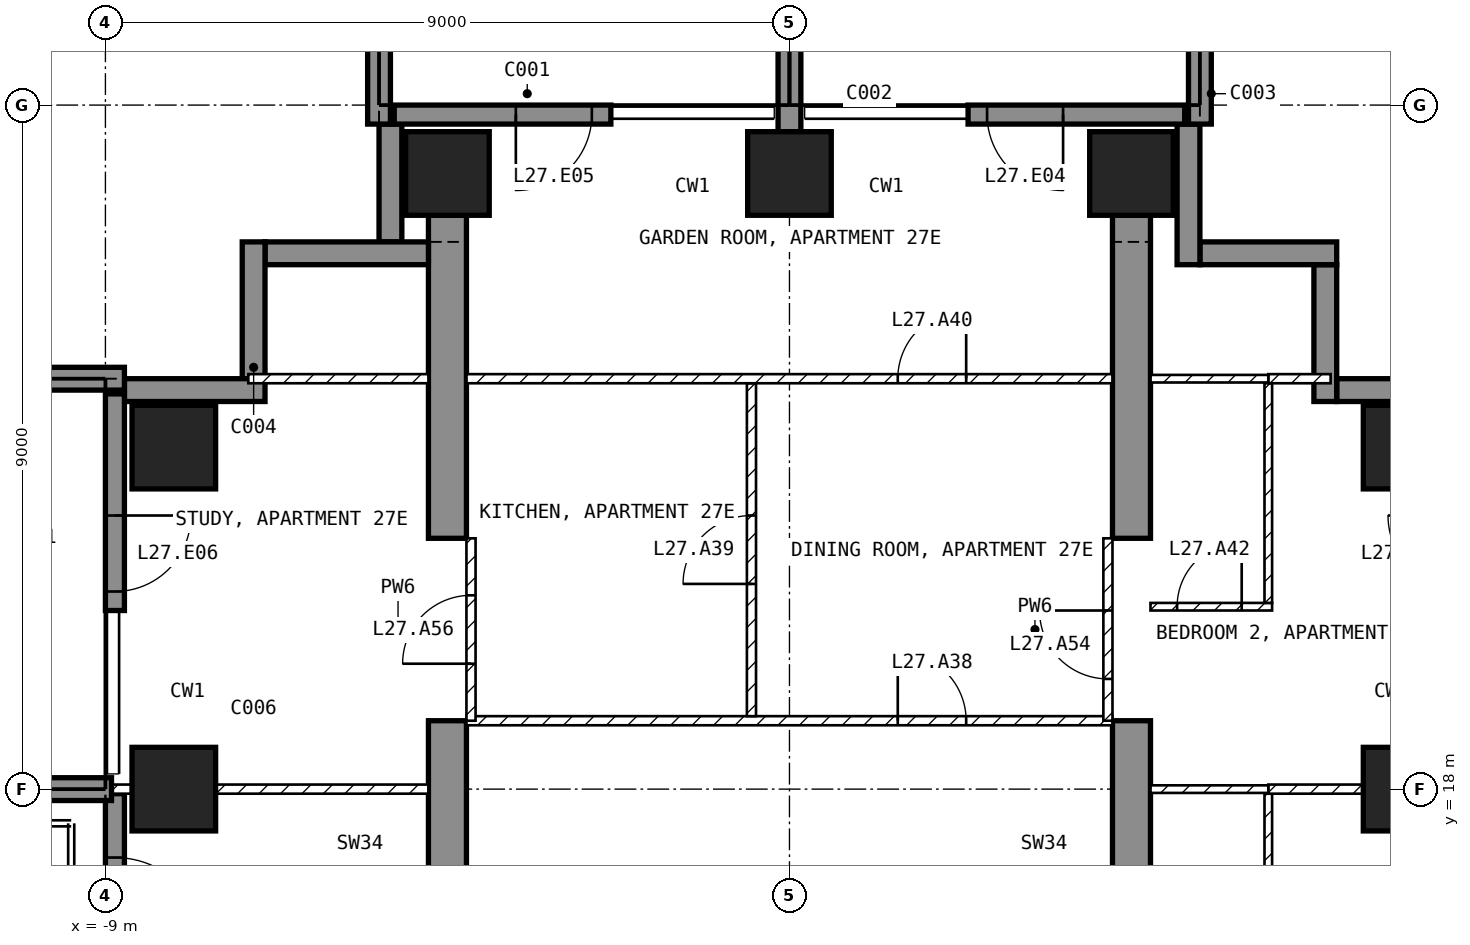
"""IFC4 building model, lengths in metres.
Left out: names, types, materials, properties, quantities, classifications, styles, units other than length and angle.
Written with IfcOpenShell. Run it as: python <this file> out.ifc"""

import sys

from ifc_helpers import new_model, si_unit, direction, frame, frame_2d, origin, origin_2d, place, context, subcontext, project, spatial, polyline, rectangle, outline, extrude, element, fill, save


model = new_model("IFC4")
c1 = context("Model", 3, precision=1e-05, world=origin(), true_north=direction((0.0, 1.0)))
c2 = subcontext(c1, "Body", "Model", "MODEL_VIEW")
j1 = project(units=[si_unit("LENGTHUNIT", "METRE"), si_unit("PLANEANGLEUNIT", "RADIAN")], contexts=[c1])
p1 = place(None, origin())
s1 = spatial("IfcSite", under=j1, at=p1, CompositionType="ELEMENT")
p2 = place(p1, origin())
s2 = spatial("IfcBuilding", under=s1, at=p2, CompositionType="ELEMENT")
p3 = place(p2, frame((0.0, 0.0, 116.4)))
s3 = spatial("IfcBuildingStorey", under=s2, at=p3, CompositionType="ELEMENT", Elevation=116.4)
for number, where, z_axis, x_axis in (
    (1, (-8.1, 18.0, -0.25), (0.0, 0.0, 1.0), (1.0, 0.0, 0.0)),
    (2, (-8.1, 22.5, -0.25), (0.0, 0.0, 1.0), (1.0, 0.0, 0.0)),
    (3, (-4.5, 26.1, -0.25), (0.0, 0.0, 1.0), (1.0, 0.0, 0.0)),
    (4, (0.0, 26.1, -0.25), (0.0, 0.0, 1.0), (1.0, 0.0, 0.0)),
    (5, (4.5, 26.1, -0.25), (0.0, 0.0, 1.0), (1.0, 0.0, 0.0)),
    (6, (8.1, 18.0, -0.25), (0.0, 0.0, 1.0), (1.0, 0.0, 0.0)),
    (7, (8.1, 22.5, -0.25), (0.0, 0.0, 1.0), (1.0, 0.0, 0.0)),
):
    element("IfcColumn", number, at=place(p3, frame(where, z_axis=z_axis, x_axis=x_axis)), inside=s3, PredefinedType="COLUMN", context=c2, shape_type="SweptSolid", body=[
        extrude(rectangle(XDim=1.1, YDim=1.1, at=origin_2d()), origin(), (0.0, 0.0, 1.0), 3.5),
    ])
for number, where, z_axis, x_axis in (
    (8, (-4.75, 9.0, -0.25), (1.0, 0.0, 0.0), (0.0, 1.0, 0.0)),
    (9, (4.25, 9.0, -0.25), (1.0, 0.0, 0.0), (0.0, 1.0, 0.0)),
):
    element("IfcWall", number, at=place(p3, frame(where, z_axis=z_axis, x_axis=x_axis)), inside=s3, PredefinedType="SHEAR", context=c2, shape_type="SweptSolid", body=[
        extrude(outline(polyline([(0.0, 0.0), (2.1, 0.0), (2.1, 2.65), (4.5, 2.65), (4.5, 0.0), (9.9, 0.0), (9.9, 2.65), (12.3, 2.65), (12.3, 0.0), (16.55, 0.0), (16.55, 3.5), (0.0, 3.5), (0.0, 0.0)])), origin(), (0.0, 0.0, 1.0), 0.5),
    ])
p4 = place(p3, frame((5.2, 26.875, 0.0), z_axis=(0.0, 0.0, 1.0), x_axis=(-1.0, 0.0, 0.0)))
e10 = element("IfcWall", 10, at=p4, inside=s3, PredefinedType="SOLIDWALL", context=c2, shape_type="SweptSolid", body=[
    extrude(rectangle(XDim=2.85, YDim=0.25, at=frame_2d((1.425, 0.0))), origin(), (0.0, 0.0, 1.0), 3.25),
])
p5 = place(p4, frame((1.6, 0.0, 0.0)))
e11 = element("IfcOpeningElement", 11, at=p5, cuts=e10, PredefinedType="OPENING", context=c2, shape_type="SweptSolid", body=[
    extrude(rectangle(XDim=1.0, YDim=2.4, at=frame_2d((0.5, 1.2))), frame((0.0, 0.135, 0.0), z_axis=(0.0, -1.0, 0.0), x_axis=(1.0, 0.0, 0.0)), (0.0, 0.0, 1.0), 0.27),
])
p6 = place(p3, frame((-2.35, 26.875, 0.0), z_axis=(0.0, 0.0, 1.0), x_axis=(-1.0, 0.0, 0.0)))
e12 = element("IfcWall", 12, at=p6, inside=s3, PredefinedType="SOLIDWALL", context=c2, shape_type="SweptSolid", body=[
    extrude(rectangle(XDim=2.85, YDim=0.25, at=frame_2d((1.425, 0.0))), origin(), (0.0, 0.0, 1.0), 3.25),
])
p7 = place(p6, frame((0.25, 0.0, 0.0)))
e13 = element("IfcOpeningElement", 13, at=p7, cuts=e12, PredefinedType="OPENING", context=c2, shape_type="SweptSolid", body=[
    extrude(rectangle(XDim=1.0, YDim=2.4, at=frame_2d((0.5, 1.2))), frame((0.0, 0.135, 0.0), z_axis=(0.0, -1.0, 0.0), x_axis=(1.0, 0.0, 0.0)), (0.0, 0.0, 1.0), 0.27),
])
p8 = place(p3, frame((-8.875, 23.2, 0.0), z_axis=(0.0, 0.0, 1.0), x_axis=(0.0, -1.0, 0.0)))
e14 = element("IfcWall", 14, at=p8, inside=s3, PredefinedType="SOLIDWALL", context=c2, shape_type="SweptSolid", body=[
    extrude(rectangle(XDim=2.85, YDim=0.25, at=frame_2d((1.425, 0.0))), origin(), (0.0, 0.0, 1.0), 3.25),
])
p9 = place(p8, frame((1.6, 0.0, 0.0)))
e15 = element("IfcOpeningElement", 15, at=p9, cuts=e14, PredefinedType="OPENING", context=c2, shape_type="SweptSolid", body=[
    extrude(rectangle(XDim=1.0, YDim=2.4, at=frame_2d((0.5, 1.2))), frame((0.0, 0.135, 0.0), z_axis=(0.0, -1.0, 0.0), x_axis=(1.0, 0.0, 0.0)), (0.0, 0.0, 1.0), 0.27),
])
p10 = place(p3, frame((-8.875, 17.94, 0.0), z_axis=(0.0, 0.0, 1.0), x_axis=(0.0, -1.0, 0.0)))
e16 = element("IfcWall", 16, at=p10, inside=s3, PredefinedType="SOLIDWALL", context=c2, shape_type="SweptSolid", body=[
    extrude(rectangle(XDim=2.29, YDim=0.25, at=frame_2d((1.145, 0.0))), origin(), (0.0, 0.0, 1.0), 3.25),
])
p11 = place(p10, frame((0.84, 0.0, 0.0)))
e17 = element("IfcOpeningElement", 17, at=p11, cuts=e16, PredefinedType="OPENING", context=c2, shape_type="SweptSolid", body=[
    extrude(rectangle(XDim=1.2, YDim=2.4, at=frame_2d((0.6, 1.2))), frame((0.0, 0.135, 0.0), z_axis=(0.0, -1.0, 0.0), x_axis=(1.0, 0.0, 0.0)), (0.0, 0.0, 1.0), 0.27),
])
p12 = place(p3, frame((8.75, 23.25, 0.0), z_axis=(0.0, 0.0, 1.0), x_axis=(-1.0, 0.0, 0.0)))
e18 = element("IfcWall", 18, at=p12, inside=s3, PredefinedType="SOLIDWALL", context=c2, shape_type="SweptSolid", body=[
    extrude(rectangle(XDim=1.55, YDim=0.3, at=frame_2d((0.775, 0.0))), origin(), (0.0, 0.0, 1.0), 3.25),
])
p13 = place(p3, frame((7.05, 23.1, 0.0), z_axis=(0.0, 0.0, 1.0), x_axis=(0.0, 1.0, 0.0)))
e19 = element("IfcWall", 19, at=p13, inside=s3, PredefinedType="SOLIDWALL", context=c2, shape_type="SweptSolid", body=[
    extrude(rectangle(XDim=1.8, YDim=0.3, at=frame_2d((0.9, 0.0))), origin(), (0.0, 0.0, 1.0), 3.25),
])
p14 = place(p3, frame((7.2, 25.05, 0.0), z_axis=(0.0, 0.0, 1.0), x_axis=(-1.0, 0.0, 0.0)))
e20 = element("IfcWall", 20, at=p14, inside=s3, PredefinedType="SOLIDWALL", context=c2, shape_type="SweptSolid", body=[
    extrude(rectangle(XDim=1.8, YDim=0.3, at=frame_2d((0.9, 0.0))), origin(), (0.0, 0.0, 1.0), 3.25),
])
p15 = place(p3, frame((5.25, 24.9, 0.0), z_axis=(0.0, 0.0, 1.0), x_axis=(0.0, 1.0, 0.0)))
e21 = element("IfcWall", 21, at=p15, inside=s3, PredefinedType="SOLIDWALL", context=c2, shape_type="SweptSolid", body=[
    extrude(rectangle(XDim=1.85, YDim=0.3, at=frame_2d((0.925, 0.0))), origin(), (0.0, 0.0, 1.0), 3.25),
])
p16 = place(p3, frame((-5.25, 26.75, 0.0), z_axis=(0.0, 0.0, 1.0), x_axis=(0.0, -1.0, 0.0)))
e22 = element("IfcWall", 22, at=p16, inside=s3, PredefinedType="SOLIDWALL", context=c2, shape_type="SweptSolid", body=[
    extrude(rectangle(XDim=1.55, YDim=0.3, at=frame_2d((0.775, 0.0))), origin(), (0.0, 0.0, 1.0), 3.25),
])
p17 = place(p3, frame((-4.75, 25.05, 0.0), z_axis=(0.0, 0.0, 1.0), x_axis=(-1.0, 0.0, 0.0)))
e23 = element("IfcWall", 23, at=p17, inside=s3, PredefinedType="SOLIDWALL", context=c2, shape_type="SweptSolid", body=[
    extrude(rectangle(XDim=2.15, YDim=0.3, at=frame_2d((1.075, 0.0))), origin(), (0.0, 0.0, 1.0), 3.25),
])
p18 = place(p3, frame((-7.05, 25.2, 0.0), z_axis=(0.0, 0.0, 1.0), x_axis=(0.0, -1.0, 0.0)))
e24 = element("IfcWall", 24, at=p18, inside=s3, PredefinedType="SOLIDWALL", context=c2, shape_type="SweptSolid", body=[
    extrude(rectangle(XDim=1.8, YDim=0.3, at=frame_2d((0.9, 0.0))), origin(), (0.0, 0.0, 1.0), 3.25),
])
p19 = place(p3, frame((-6.9, 23.25, 0.0), z_axis=(0.0, 0.0, 1.0), x_axis=(-1.0, 0.0, 0.0)))
e25 = element("IfcWall", 25, at=p19, inside=s3, PredefinedType="SOLIDWALL", context=c2, shape_type="SweptSolid", body=[
    extrude(rectangle(XDim=1.85, YDim=0.3, at=frame_2d((0.925, 0.0))), origin(), (0.0, 0.0, 1.0), 3.25),
])
p20 = place(p3, frame((-8.92, 18.0, 0.0), z_axis=(0.0, 0.0, 1.0), x_axis=(-1.0, 0.0, 0.0)))
e26 = element("IfcWall", 26, at=p20, inside=s3, PredefinedType="SOLIDWALL", context=c2, shape_type="SweptSolid", body=[
    extrude(rectangle(XDim=2.82, YDim=0.3, at=frame_2d((1.41, 0.0))), origin(), (0.0, 0.0, 1.0), 3.25),
])
for number, where, z_axis, x_axis in (
    (27, (-8.75, 23.4, 0.0), (0.0, 0.0, 1.0), (-1.0, 0.0, 0.0)),
    (28, (-5.4, 26.75, 0.0), (0.0, 0.0, 1.0), (0.0, 1.0, 0.0)),
):
    element("IfcWall", number, at=place(p3, frame(where, z_axis=z_axis, x_axis=x_axis)), inside=s3, PredefinedType="SOLIDWALL", context=c2, shape_type="SweptSolid", body=[
        extrude(rectangle(XDim=2.95, YDim=0.3, at=frame_2d((1.475, 0.0))), origin(), (0.0, 0.0, 1.0), 3.25),
    ])
p21 = place(p3, frame((0.0, 26.65, 0.0), z_axis=(0.0, 0.0, 1.0), x_axis=(0.0, 1.0, 0.0)))
e29 = element("IfcWall", 29, at=p21, inside=s3, PredefinedType="SOLIDWALL", context=c2, shape_type="SweptSolid", body=[
    extrude(rectangle(XDim=3.05, YDim=0.3, at=frame_2d((1.525, 0.0))), origin(), (0.0, 0.0, 1.0), 3.25),
])
p22 = place(p3, frame((5.4, 26.75, 0.0), z_axis=(0.0, 0.0, 1.0), x_axis=(0.0, 1.0, 0.0)))
e30 = element("IfcWall", 30, at=p22, inside=s3, PredefinedType="SOLIDWALL", context=c2, shape_type="SweptSolid", body=[
    extrude(rectangle(XDim=2.95, YDim=0.3, at=frame_2d((1.475, 0.0))), origin(), (0.0, 0.0, 1.0), 3.25),
])
p23 = place(p3, frame((-4.25, 18.9, 0.0), z_axis=(0.0, 0.0, 1.0), x_axis=(1.0, 0.0, 0.0)))
e31 = element("IfcWall", 31, at=p23, inside=s3, PredefinedType="PARTITIONING", context=c2, shape_type="SweptSolid", body=[
    extrude(rectangle(XDim=8.5, YDim=0.12, at=frame_2d((4.25, 0.0))), origin(), (0.0, 0.0, 1.0), 3.25),
])
p24 = place(p23, frame((5.675, 0.0, 0.0)))
e32 = element("IfcOpeningElement", 32, at=p24, cuts=e31, PredefinedType="OPENING", context=c2, shape_type="SweptSolid", body=[
    extrude(rectangle(XDim=0.9, YDim=2.1, at=frame_2d((0.45, 1.05))), frame((0.0, 0.07, 0.0), z_axis=(0.0, -1.0, 0.0), x_axis=(1.0, 0.0, 0.0)), (0.0, 0.0, 1.0), 0.14),
])
p25 = place(p3, frame((-0.5, 18.96, 0.0), z_axis=(0.0, 0.0, 1.0), x_axis=(0.0, 1.0, 0.0)))
e33 = element("IfcWall", 33, at=p25, inside=s3, PredefinedType="PARTITIONING", context=c2, shape_type="SweptSolid", body=[
    extrude(rectangle(XDim=4.38, YDim=0.12, at=frame_2d((2.19, 0.0))), origin(), (0.0, 0.0, 1.0), 3.25),
])
p26 = place(p25, frame((1.74, 0.0, 0.0)))
e34 = element("IfcOpeningElement", 34, at=p26, cuts=e33, PredefinedType="OPENING", context=c2, shape_type="SweptSolid", body=[
    extrude(rectangle(XDim=0.9, YDim=2.1, at=frame_2d((0.45, 1.05))), frame((0.0, 0.07, 0.0), z_axis=(0.0, -1.0, 0.0), x_axis=(1.0, 0.0, 0.0)), (0.0, 0.0, 1.0), 0.14),
])
p27 = place(p3, frame((-4.25, 23.4, 0.0), z_axis=(0.0, 0.0, 1.0), x_axis=(1.0, 0.0, 0.0)))
e35 = element("IfcWall", 35, at=p27, inside=s3, PredefinedType="PARTITIONING", context=c2, shape_type="SweptSolid", body=[
    extrude(rectangle(XDim=8.5, YDim=0.12, at=frame_2d((4.25, 0.0))), origin(), (0.0, 0.0, 1.0), 3.25),
])
p28 = place(p27, frame((5.675, 0.0, 0.0)))
e36 = element("IfcOpeningElement", 36, at=p28, cuts=e35, PredefinedType="OPENING", context=c2, shape_type="SweptSolid", body=[
    extrude(rectangle(XDim=0.9, YDim=2.1, at=frame_2d((0.45, 1.05))), frame((0.0, 0.07, 0.0), z_axis=(0.0, -1.0, 0.0), x_axis=(1.0, 0.0, 0.0)), (0.0, 0.0, 1.0), 0.14),
])
p29 = place(p3, frame((6.3, 14.45, 0.0), z_axis=(0.0, 0.0, 1.0), x_axis=(0.0, 1.0, 0.0)))
e37 = element("IfcWall", 37, at=p29, inside=s3, PredefinedType="PARTITIONING", context=c2, shape_type="SweptSolid", body=[
    extrude(rectangle(XDim=3.49, YDim=0.1, at=frame_2d((1.745, 0.0))), origin(), (0.0, 0.0, 1.0), 3.25),
])
p30 = place(p3, frame((6.3, 18.0, 0.0), z_axis=(0.0, 0.0, 1.0), x_axis=(1.0, 0.0, 0.0)))
e38 = element("IfcWall", 38, at=p30, inside=s3, PredefinedType="PARTITIONING", context=c2, shape_type="SweptSolid", body=[
    extrude(rectangle(XDim=2.62, YDim=0.12, at=frame_2d((1.31, 0.0))), origin(), (0.0, 0.0, 1.0), 2.414),
])
p31 = place(p3, frame((4.75, 18.0, 0.0), z_axis=(0.0, 0.0, 1.0), x_axis=(1.0, 0.0, 0.0)))
e39 = element("IfcWall", 39, at=p31, inside=s3, PredefinedType="PARTITIONING", context=c2, shape_type="SweptSolid", body=[
    extrude(rectangle(XDim=1.55, YDim=0.1, at=frame_2d((0.775, 0.0))), origin(), (0.0, 0.0, 1.0), 2.414),
])
p32 = place(p3, frame((4.75, 20.4, 0.0), z_axis=(0.0, 0.0, 1.0), x_axis=(1.0, 0.0, 0.0)))
e40 = element("IfcWall", 40, at=p32, inside=s3, PredefinedType="PARTITIONING", context=c2, shape_type="SweptSolid", body=[
    extrude(rectangle(XDim=1.6, YDim=0.1, at=frame_2d((0.8, 0.0))), origin(), (0.0, 0.0, 1.0), 3.25),
])
p33 = place(p32, frame((0.35, 0.0, 0.0)))
e41 = element("IfcOpeningElement", 41, at=p33, cuts=e40, PredefinedType="OPENING", context=c2, shape_type="SweptSolid", body=[
    extrude(rectangle(XDim=0.85, YDim=2.1, at=frame_2d((0.425, 1.05))), frame((0.0, 0.06, 0.0), z_axis=(0.0, -1.0, 0.0), x_axis=(1.0, 0.0, 0.0)), (0.0, 0.0, 1.0), 0.12),
])
p34 = place(p3, frame((6.3, 20.45, 0.0), z_axis=(0.0, 0.0, 1.0), x_axis=(0.0, 1.0, 0.0)))
e42 = element("IfcWall", 42, at=p34, inside=s3, PredefinedType="PARTITIONING", context=c2, shape_type="SweptSolid", body=[
    extrude(rectangle(XDim=2.89, YDim=0.1, at=frame_2d((1.445, 0.0))), origin(), (0.0, 0.0, 1.0), 3.25),
])
p35 = place(p3, frame((6.3, 23.4, 0.0), z_axis=(0.0, 0.0, 1.0), x_axis=(1.0, 0.0, 0.0)))
e43 = element("IfcWall", 43, at=p35, inside=s3, PredefinedType="PARTITIONING", context=c2, shape_type="SweptSolid", body=[
    extrude(rectangle(XDim=0.82, YDim=0.12, at=frame_2d((0.41, 0.0))), origin(), (0.0, 0.0, 1.0), 3.25),
])
p36 = place(p3, frame((4.75, 23.4, 0.0), z_axis=(0.0, 0.0, 1.0), x_axis=(1.0, 0.0, 0.0)))
e44 = element("IfcWall", 44, at=p36, inside=s3, PredefinedType="PARTITIONING", context=c2, shape_type="SweptSolid", body=[
    extrude(rectangle(XDim=1.55, YDim=0.1, at=frame_2d((0.775, 0.0))), origin(), (0.0, 0.0, 1.0), 3.25),
])
p37 = place(p3, frame((-8.92, 18.0, 0.0), z_axis=(0.0, 0.0, 1.0), x_axis=(1.0, 0.0, 0.0)))
e45 = element("IfcWall", 45, at=p37, inside=s3, PredefinedType="PARTITIONING", context=c2, shape_type="SweptSolid", body=[
    extrude(rectangle(XDim=4.17, YDim=0.12, at=frame_2d((2.085, 0.0))), origin(), (0.0, 0.0, 1.0), 2.414),
])
p38 = place(p3, frame((-7.12, 23.4, 0.0), z_axis=(0.0, 0.0, 1.0), x_axis=(1.0, 0.0, 0.0)))
e46 = element("IfcWall", 46, at=p38, inside=s3, PredefinedType="PARTITIONING", context=c2, shape_type="SweptSolid", body=[
    extrude(rectangle(XDim=2.37, YDim=0.12, at=frame_2d((1.185, 0.0))), origin(), (0.0, 0.0, 1.0), 3.25),
])
p39 = place(p3, frame((4.19, 18.9, 0.0), z_axis=(0.0, 0.0, 1.0), x_axis=(0.0, 1.0, 0.0)))
e47 = element("IfcWall", 47, at=p39, inside=s3, PredefinedType="PARTITIONING", context=c2, shape_type="SweptSolid", body=[
    extrude(rectangle(XDim=2.4, YDim=0.12, at=frame_2d((1.2, 0.0))), origin(), (0.0, 0.0, 1.0), 2.4),
])
p40 = place(p39, frame((0.55, 0.0, 0.0)))
e48 = element("IfcOpeningElement", 48, at=p40, cuts=e47, PredefinedType="OPENING", context=c2, shape_type="SweptSolid", body=[
    extrude(rectangle(XDim=0.9, YDim=2.1, at=frame_2d((0.45, 1.05))), frame((0.0, 0.07, 0.0), z_axis=(0.0, -1.0, 0.0), x_axis=(1.0, 0.0, 0.0)), (0.0, 0.0, 1.0), 0.14),
])
p41 = place(p3, frame((-4.19, 18.9, 0.0), z_axis=(0.0, 0.0, 1.0), x_axis=(0.0, 1.0, 0.0)))
e49 = element("IfcWall", 49, at=p41, inside=s3, PredefinedType="PARTITIONING", context=c2, shape_type="SweptSolid", body=[
    extrude(rectangle(XDim=2.4, YDim=0.12, at=frame_2d((1.2, 0.0))), origin(), (0.0, 0.0, 1.0), 2.4),
])
p42 = place(p41, frame((0.75, 0.0, 0.0)))
e50 = element("IfcOpeningElement", 50, at=p42, cuts=e49, PredefinedType="OPENING", context=c2, shape_type="SweptSolid", body=[
    extrude(rectangle(XDim=0.9, YDim=2.1, at=frame_2d((0.45, 1.05))), frame((0.0, 0.07, 0.0), z_axis=(0.0, -1.0, 0.0), x_axis=(1.0, 0.0, 0.0)), (0.0, 0.0, 1.0), 0.14),
])
p43 = place(p5, origin())
e51 = element("IfcDoor", 51, at=p43, inside=s3, OperationType="SINGLE_SWING_LEFT", PredefinedType="DOOR", context=c2, shape_type="SweptSolid", body=[
    extrude(rectangle(XDim=1.0, YDim=2.4, at=frame_2d((0.5, 1.2))), frame((0.0, 0.025, 0.0), z_axis=(0.0, -1.0, 0.0), x_axis=(1.0, 0.0, 0.0)), (0.0, 0.0, 1.0), 0.05),
])
fill(e11, e51)
p44 = place(p7, origin())
e52 = element("IfcDoor", 52, at=p44, inside=s3, OperationType="SINGLE_SWING_RIGHT", PredefinedType="DOOR", context=c2, shape_type="SweptSolid", body=[
    extrude(rectangle(XDim=1.0, YDim=2.4, at=frame_2d((0.5, 1.2))), frame((0.0, 0.025, 0.0), z_axis=(0.0, -1.0, 0.0), x_axis=(1.0, 0.0, 0.0)), (0.0, 0.0, 1.0), 0.05),
])
fill(e13, e52)
p45 = place(p9, origin())
e53 = element("IfcDoor", 53, at=p45, inside=s3, OperationType="SINGLE_SWING_LEFT", PredefinedType="DOOR", context=c2, shape_type="SweptSolid", body=[
    extrude(rectangle(XDim=1.0, YDim=2.4, at=frame_2d((0.5, 1.2))), frame((0.0, 0.025, 0.0), z_axis=(0.0, -1.0, 0.0), x_axis=(1.0, 0.0, 0.0)), (0.0, 0.0, 1.0), 0.05),
])
fill(e15, e53)
p46 = place(p11, origin())
e54 = element("IfcDoor", 54, at=p46, inside=s3, OperationType="SINGLE_SWING_RIGHT", PredefinedType="DOOR", context=c2, shape_type="SweptSolid", body=[
    extrude(rectangle(XDim=1.2, YDim=2.4, at=frame_2d((0.6, 1.2))), frame((0.0, 0.025, 0.0), z_axis=(0.0, -1.0, 0.0), x_axis=(1.0, 0.0, 0.0)), (0.0, 0.0, 1.0), 0.05),
])
fill(e17, e54)
p47 = place(p24, origin())
e55 = element("IfcDoor", 55, at=p47, inside=s3, OperationType="SINGLE_SWING_LEFT", PredefinedType="DOOR", context=c2, shape_type="SweptSolid", body=[
    extrude(rectangle(XDim=0.9, YDim=2.1, at=frame_2d((0.45, 1.05))), frame((0.0, 0.025, 0.0), z_axis=(0.0, -1.0, 0.0), x_axis=(1.0, 0.0, 0.0)), (0.0, 0.0, 1.0), 0.05),
])
fill(e32, e55)
p48 = place(p26, origin())
e56 = element("IfcDoor", 56, at=p48, inside=s3, OperationType="SINGLE_SWING_LEFT", PredefinedType="DOOR", context=c2, shape_type="SweptSolid", body=[
    extrude(rectangle(XDim=0.9, YDim=2.1, at=frame_2d((0.45, 1.05))), frame((0.0, 0.025, 0.0), z_axis=(0.0, -1.0, 0.0), x_axis=(1.0, 0.0, 0.0)), (0.0, 0.0, 1.0), 0.05),
])
fill(e34, e56)
p49 = place(p28, origin())
e57 = element("IfcDoor", 57, at=p49, inside=s3, OperationType="SINGLE_SWING_RIGHT", PredefinedType="DOOR", context=c2, shape_type="SweptSolid", body=[
    extrude(rectangle(XDim=0.9, YDim=2.1, at=frame_2d((0.45, 1.05))), frame((0.0, 0.025, 0.0), z_axis=(0.0, -1.0, 0.0), x_axis=(1.0, 0.0, 0.0)), (0.0, 0.0, 1.0), 0.05),
])
fill(e36, e57)
p50 = place(p33, origin())
e58 = element("IfcDoor", 58, at=p50, inside=s3, OperationType="SINGLE_SWING_RIGHT", PredefinedType="DOOR", context=c2, shape_type="SweptSolid", body=[
    extrude(rectangle(XDim=0.85, YDim=2.1, at=frame_2d((0.425, 1.05))), frame((0.0, 0.025, 0.0), z_axis=(0.0, -1.0, 0.0), x_axis=(1.0, 0.0, 0.0)), (0.0, 0.0, 1.0), 0.05),
])
fill(e41, e58)
p51 = place(p40, origin())
e59 = element("IfcDoor", 59, at=p51, inside=s3, OperationType="SINGLE_SWING_RIGHT", PredefinedType="DOOR", context=c2, shape_type="SweptSolid", body=[
    extrude(rectangle(XDim=0.9, YDim=2.1, at=frame_2d((0.45, 1.05))), frame((0.0, 0.025, 0.0), z_axis=(0.0, -1.0, 0.0), x_axis=(1.0, 0.0, 0.0)), (0.0, 0.0, 1.0), 0.05),
])
fill(e48, e59)
p52 = place(p42, origin())
e60 = element("IfcDoor", 60, at=p52, inside=s3, OperationType="SINGLE_SWING_LEFT", PredefinedType="DOOR", context=c2, shape_type="SweptSolid", body=[
    extrude(rectangle(XDim=0.9, YDim=2.1, at=frame_2d((0.45, 1.05))), frame((0.0, 0.025, 0.0), z_axis=(0.0, -1.0, 0.0), x_axis=(1.0, 0.0, 0.0)), (0.0, 0.0, 1.0), 0.05),
])
fill(e50, e60)
save(model, sys.argv[1])
